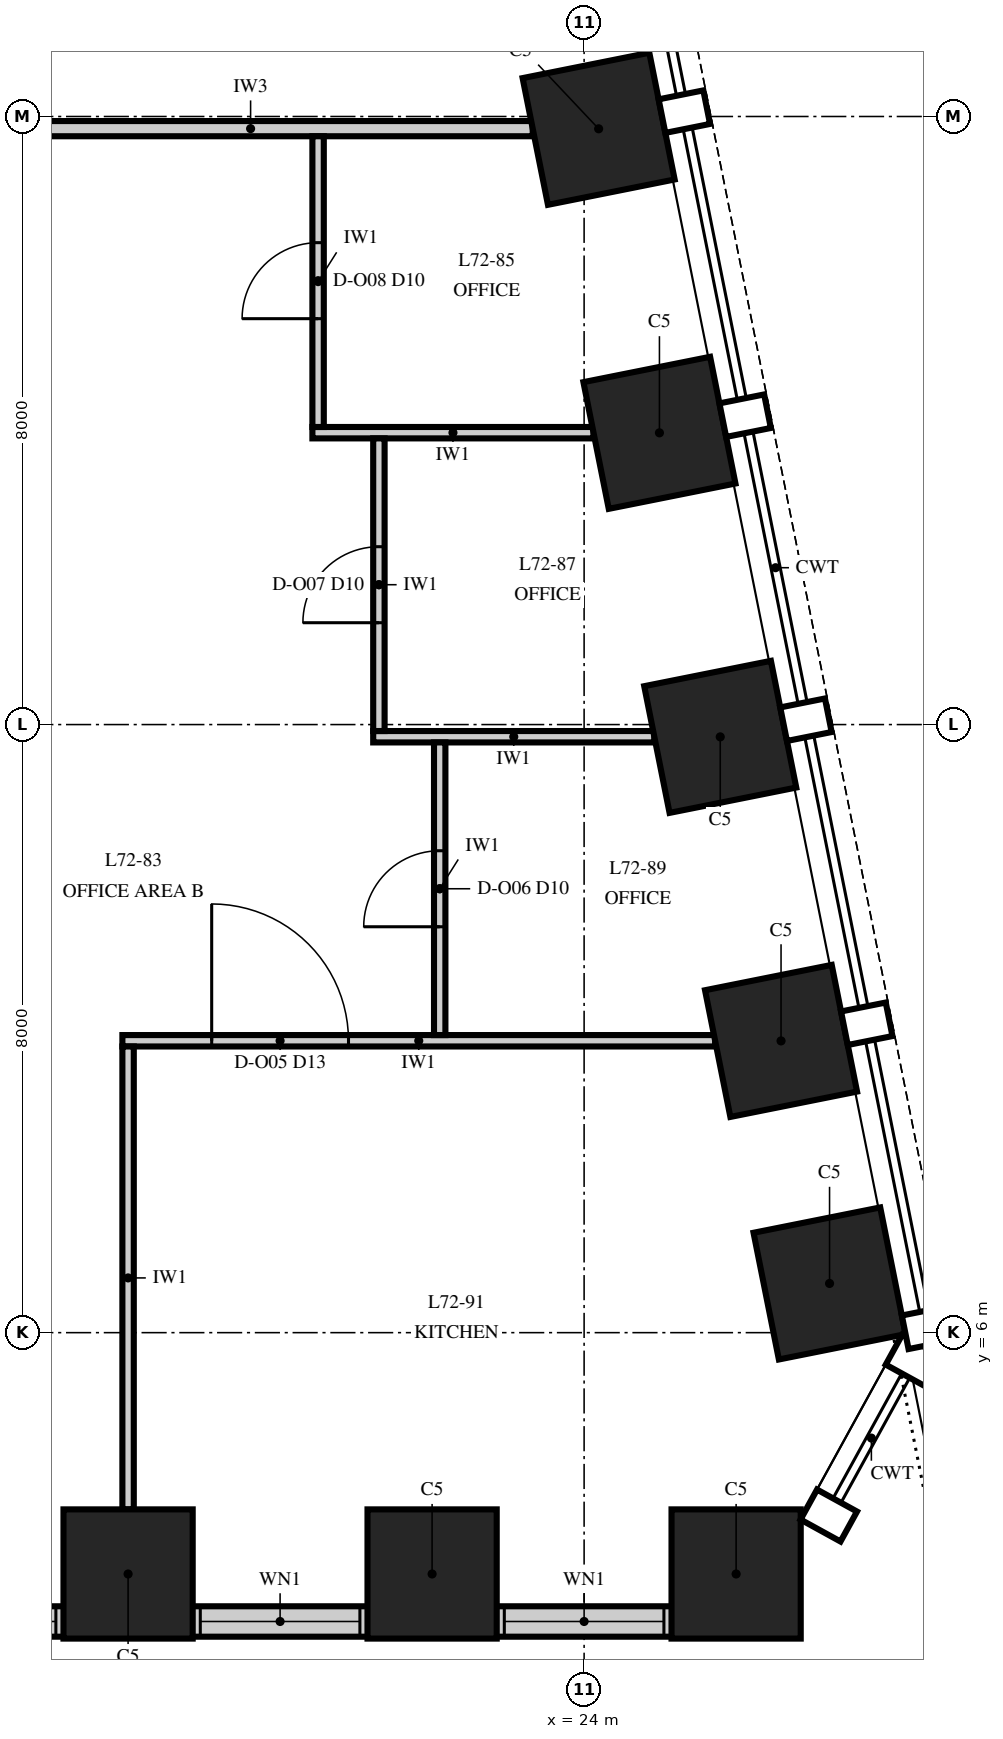
"""IFC4 building model, lengths in metres.
Left out: names, types, materials, properties, quantities, classifications, styles, units other than length and angle.
Written with IfcOpenShell. Run it as: python <this file> out.ifc"""

import sys

from ifc_helpers import new_model, si_unit, direction, frame, frame_2d, origin, origin_2d, place, context, subcontext, project, spatial, rectangle, extrude, element, fill, save


model = new_model("IFC4")
c1 = context("Model", 3, precision=1e-05, world=origin(), true_north=direction((0.0, 1.0)))
c2 = subcontext(c1, "Body", "Model", "MODEL_VIEW")
j1 = project(units=[si_unit("LENGTHUNIT", "METRE"), si_unit("PLANEANGLEUNIT", "RADIAN")], contexts=[c1])
p1 = place(None, origin())
s1 = spatial("IfcSite", under=j1, at=p1, CompositionType="ELEMENT")
p2 = place(p1, origin())
s2 = spatial("IfcBuilding", under=s1, at=p2, CompositionType="ELEMENT")
p3 = place(p2, frame((0.0, 0.0, 308.0)))
s3 = spatial("IfcBuildingStorey", under=s2, at=p3, CompositionType="ELEMENT", Elevation=308.0)
for number, where, z_axis, x_axis in (
    (1, (18.0, 2.825, -0.25), (0.0, 0.0, 1.0), (1.0, 0.0, 0.0)),
    (2, (22.0, 2.825, -0.25), (0.0, 0.0, 1.0), (1.0, 0.0, 0.0)),
    (3, (26.0, 2.825, -0.25), (0.0, 0.0, 1.0), (1.0, 0.0, 0.0)),
):
    element("IfcColumn", number, at=place(p3, frame(where, z_axis=z_axis, x_axis=x_axis)), inside=s3, PredefinedType="COLUMN", context=c2, shape_type="SweptSolid", body=[
        extrude(rectangle(XDim=1.7, YDim=1.7, at=origin_2d()), origin(), (0.0, 0.0, 1.0), 4.25),
    ])
for number, where, z_axis, x_axis in (
    (4, (27.229, 6.647, 0.0), (0.0, 0.0, 1.0), (-0.196, 0.981, 0.0)),
    (5, (26.591, 9.838, 0.0), (0.0, 0.0, 1.0), (-0.196, 0.981, 0.0)),
    (6, (25.791, 13.838, 0.0), (0.0, 0.0, 1.0), (-0.196, 0.981, 0.0)),
    (7, (24.991, 17.838, 0.0), (0.0, 0.0, 1.0), (-0.196, 0.981, 0.0)),
    (8, (24.191, 21.838, 0.0), (0.0, 0.0, 1.0), (-0.196, 0.981, 0.0)),
):
    element("IfcColumn", number, at=place(p3, frame(where, z_axis=z_axis, x_axis=x_axis)), inside=s3, PredefinedType="COLUMN", context=c2, shape_type="SweptSolid", body=[
        extrude(rectangle(XDim=1.7, YDim=1.7, at=origin_2d()), origin(), (0.0, 0.0, 1.0), 4.0),
    ])
p4 = place(p3, frame((-26.0, 2.2, 0.0), z_axis=(0.0, 0.0, 1.0), x_axis=(1.0, 0.0, 0.0)))
e9 = element("IfcWall", 9, at=p4, inside=s3, PredefinedType="SOLIDWALL", context=c2, shape_type="SweptSolid", body=[
    extrude(rectangle(XDim=52.0, YDim=0.4, at=frame_2d((26.0, 0.0))), origin(), (0.0, 0.0, 1.0), 2.0),
])
p5 = place(p4, frame((0.95, 0.0, 0.8)))
e10 = element("IfcOpeningElement", 10, at=p5, cuts=e9, PredefinedType="OPENING", context=c2, shape_type="SweptSolid", body=[
    extrude(rectangle(XDim=2.1, YDim=1.15, at=frame_2d((1.05, 0.575))), frame((0.0, 0.215, 0.0), z_axis=(0.0, -1.0, 0.0), x_axis=(1.0, 0.0, 0.0)), (0.0, 0.0, 1.0), 0.43),
])
p6 = place(p4, frame((4.95, 0.0, 0.8)))
e11 = element("IfcOpeningElement", 11, at=p6, cuts=e9, PredefinedType="OPENING", context=c2, shape_type="SweptSolid", body=[
    extrude(rectangle(XDim=2.1, YDim=1.15, at=frame_2d((1.05, 0.575))), frame((0.0, 0.215, 0.0), z_axis=(0.0, -1.0, 0.0), x_axis=(1.0, 0.0, 0.0)), (0.0, 0.0, 1.0), 0.43),
])
p7 = place(p4, frame((8.95, 0.0, 0.8)))
e12 = element("IfcOpeningElement", 12, at=p7, cuts=e9, PredefinedType="OPENING", context=c2, shape_type="SweptSolid", body=[
    extrude(rectangle(XDim=2.1, YDim=1.15, at=frame_2d((1.05, 0.575))), frame((0.0, 0.215, 0.0), z_axis=(0.0, -1.0, 0.0), x_axis=(1.0, 0.0, 0.0)), (0.0, 0.0, 1.0), 0.43),
])
p8 = place(p4, frame((12.95, 0.0, 0.8)))
e13 = element("IfcOpeningElement", 13, at=p8, cuts=e9, PredefinedType="OPENING", context=c2, shape_type="SweptSolid", body=[
    extrude(rectangle(XDim=2.1, YDim=1.15, at=frame_2d((1.05, 0.575))), frame((0.0, 0.215, 0.0), z_axis=(0.0, -1.0, 0.0), x_axis=(1.0, 0.0, 0.0)), (0.0, 0.0, 1.0), 0.43),
])
p9 = place(p4, frame((16.95, 0.0, 0.8)))
e14 = element("IfcOpeningElement", 14, at=p9, cuts=e9, PredefinedType="OPENING", context=c2, shape_type="SweptSolid", body=[
    extrude(rectangle(XDim=2.1, YDim=1.15, at=frame_2d((1.05, 0.575))), frame((0.0, 0.215, 0.0), z_axis=(0.0, -1.0, 0.0), x_axis=(1.0, 0.0, 0.0)), (0.0, 0.0, 1.0), 0.43),
])
p10 = place(p4, frame((21.1, 0.0, 0.0)))
e15 = element("IfcOpeningElement", 15, at=p10, cuts=e9, PredefinedType="OPENING", context=c2, shape_type="SweptSolid", body=[
    extrude(rectangle(XDim=1.8, YDim=2.0, at=frame_2d((0.9, 1.0))), frame((0.0, 0.215, 0.0), z_axis=(0.0, -1.0, 0.0), x_axis=(1.0, 0.0, 0.0)), (0.0, 0.0, 1.0), 0.43),
])
p11 = place(p4, frame((24.95, 0.0, 0.8)))
e16 = element("IfcOpeningElement", 16, at=p11, cuts=e9, PredefinedType="OPENING", context=c2, shape_type="SweptSolid", body=[
    extrude(rectangle(XDim=2.1, YDim=1.15, at=frame_2d((1.05, 0.575))), frame((0.0, 0.215, 0.0), z_axis=(0.0, -1.0, 0.0), x_axis=(1.0, 0.0, 0.0)), (0.0, 0.0, 1.0), 0.43),
])
p12 = place(p4, frame((29.1, 0.0, 0.0)))
e17 = element("IfcOpeningElement", 17, at=p12, cuts=e9, PredefinedType="OPENING", context=c2, shape_type="SweptSolid", body=[
    extrude(rectangle(XDim=1.8, YDim=2.0, at=frame_2d((0.9, 1.0))), frame((0.0, 0.215, 0.0), z_axis=(0.0, -1.0, 0.0), x_axis=(1.0, 0.0, 0.0)), (0.0, 0.0, 1.0), 0.43),
])
p13 = place(p4, frame((32.95, 0.0, 0.8)))
e18 = element("IfcOpeningElement", 18, at=p13, cuts=e9, PredefinedType="OPENING", context=c2, shape_type="SweptSolid", body=[
    extrude(rectangle(XDim=2.1, YDim=1.15, at=frame_2d((1.05, 0.575))), frame((0.0, 0.215, 0.0), z_axis=(0.0, -1.0, 0.0), x_axis=(1.0, 0.0, 0.0)), (0.0, 0.0, 1.0), 0.43),
])
p14 = place(p4, frame((36.95, 0.0, 0.8)))
e19 = element("IfcOpeningElement", 19, at=p14, cuts=e9, PredefinedType="OPENING", context=c2, shape_type="SweptSolid", body=[
    extrude(rectangle(XDim=2.1, YDim=1.15, at=frame_2d((1.05, 0.575))), frame((0.0, 0.215, 0.0), z_axis=(0.0, -1.0, 0.0), x_axis=(1.0, 0.0, 0.0)), (0.0, 0.0, 1.0), 0.43),
])
p15 = place(p4, frame((40.95, 0.0, 0.8)))
e20 = element("IfcOpeningElement", 20, at=p15, cuts=e9, PredefinedType="OPENING", context=c2, shape_type="SweptSolid", body=[
    extrude(rectangle(XDim=2.1, YDim=1.15, at=frame_2d((1.05, 0.575))), frame((0.0, 0.215, 0.0), z_axis=(0.0, -1.0, 0.0), x_axis=(1.0, 0.0, 0.0)), (0.0, 0.0, 1.0), 0.43),
])
p16 = place(p4, frame((44.95, 0.0, 0.8)))
e21 = element("IfcOpeningElement", 21, at=p16, cuts=e9, PredefinedType="OPENING", context=c2, shape_type="SweptSolid", body=[
    extrude(rectangle(XDim=2.1, YDim=1.15, at=frame_2d((1.05, 0.575))), frame((0.0, 0.215, 0.0), z_axis=(0.0, -1.0, 0.0), x_axis=(1.0, 0.0, 0.0)), (0.0, 0.0, 1.0), 0.43),
])
p17 = place(p4, frame((48.95, 0.0, 0.8)))
e22 = element("IfcOpeningElement", 22, at=p17, cuts=e9, PredefinedType="OPENING", context=c2, shape_type="SweptSolid", body=[
    extrude(rectangle(XDim=2.1, YDim=1.15, at=frame_2d((1.05, 0.575))), frame((0.0, 0.215, 0.0), z_axis=(0.0, -1.0, 0.0), x_axis=(1.0, 0.0, 0.0)), (0.0, 0.0, 1.0), 0.43),
])
p18 = place(p3, frame((17.925, 9.84, 0.0), z_axis=(0.0, 0.0, 1.0), x_axis=(1.0, 0.0, 0.0)))
e23 = element("IfcWall", 23, at=p18, inside=s3, PredefinedType="PARTITIONING", context=c2, shape_type="SweptSolid", body=[
    extrude(rectangle(XDim=7.799, YDim=0.15, at=frame_2d((3.899, 0.0))), origin(), (0.0, 0.0, 1.0), 3.23),
])
p19 = place(p18, frame((1.175, 0.0, 0.0)))
e24 = element("IfcOpeningElement", 24, at=p19, cuts=e23, PredefinedType="OPENING", context=c2, shape_type="SweptSolid", body=[
    extrude(rectangle(XDim=1.8, YDim=2.4, at=frame_2d((0.9, 1.2))), frame((0.0, 0.09, 0.0), z_axis=(0.0, -1.0, 0.0), x_axis=(1.0, 0.0, 0.0)), (0.0, 0.0, 1.0), 0.18),
])
for number, where, z_axis, x_axis in (
    (25, (21.225, 13.84, 0.0), (0.0, 0.0, 1.0), (1.0, 0.0, 0.0)),
    (26, (20.425, 17.84, 0.0), (0.0, 0.0, 1.0), (1.0, 0.0, 0.0)),
):
    element("IfcWall", number, at=place(p3, frame(where, z_axis=z_axis, x_axis=x_axis)), inside=s3, PredefinedType="PARTITIONING", context=c2, shape_type="SweptSolid", body=[
        extrude(rectangle(XDim=3.699, YDim=0.15, at=frame_2d((1.849, 0.0))), origin(), (0.0, 0.0, 1.0), 3.23),
    ])
p20 = place(p3, frame((15.9, 21.84, 0.0), z_axis=(0.0, 0.0, 1.0), x_axis=(1.0, 0.0, 0.0)))
e27 = element("IfcWall", 27, at=p20, inside=s3, PredefinedType="PARTITIONING", context=c2, shape_type="SweptSolid", body=[
    extrude(rectangle(XDim=7.424, YDim=0.2, at=frame_2d((3.712, 0.0))), origin(), (0.0, 0.0, 1.0), 3.23),
])
p21 = place(p3, frame((18.0, 3.675, 0.0), z_axis=(0.0, 0.0, 1.0), x_axis=(0.0, 1.0, 0.0)))
e28 = element("IfcWall", 28, at=p21, inside=s3, PredefinedType="PARTITIONING", context=c2, shape_type="SweptSolid", body=[
    extrude(rectangle(XDim=6.09, YDim=0.15, at=frame_2d((3.045, 0.0))), origin(), (0.0, 0.0, 1.0), 2.842),
])
p22 = place(p3, frame((20.5, 17.915, 0.0), z_axis=(0.0, 0.0, 1.0), x_axis=(0.0, 1.0, 0.0)))
e29 = element("IfcWall", 29, at=p22, inside=s3, PredefinedType="PARTITIONING", context=c2, shape_type="SweptSolid", body=[
    extrude(rectangle(XDim=3.825, YDim=0.15, at=frame_2d((1.913, 0.0))), origin(), (0.0, 0.0, 1.0), 3.23),
])
p23 = place(p22, frame((1.425, 0.0, 0.0)))
e30 = element("IfcOpeningElement", 30, at=p23, cuts=e29, PredefinedType="OPENING", context=c2, shape_type="SweptSolid", body=[
    extrude(rectangle(XDim=1.0, YDim=2.3, at=frame_2d((0.5, 1.15))), frame((0.0, 0.09, 0.0), z_axis=(0.0, -1.0, 0.0), x_axis=(1.0, 0.0, 0.0)), (0.0, 0.0, 1.0), 0.18),
])
p24 = place(p3, frame((21.3, 13.915, 0.0), z_axis=(0.0, 0.0, 1.0), x_axis=(0.0, 1.0, 0.0)))
e31 = element("IfcWall", 31, at=p24, inside=s3, PredefinedType="PARTITIONING", context=c2, shape_type="SweptSolid", body=[
    extrude(rectangle(XDim=3.85, YDim=0.15, at=frame_2d((1.925, 0.0))), origin(), (0.0, 0.0, 1.0), 3.23),
])
p25 = place(p24, frame((1.425, 0.0, 0.0)))
e32 = element("IfcOpeningElement", 32, at=p25, cuts=e31, PredefinedType="OPENING", context=c2, shape_type="SweptSolid", body=[
    extrude(rectangle(XDim=1.0, YDim=2.3, at=frame_2d((0.5, 1.15))), frame((0.0, 0.09, 0.0), z_axis=(0.0, -1.0, 0.0), x_axis=(1.0, 0.0, 0.0)), (0.0, 0.0, 1.0), 0.18),
])
p26 = place(p3, frame((22.1, 9.915, 0.0), z_axis=(0.0, 0.0, 1.0), x_axis=(0.0, 1.0, 0.0)))
e33 = element("IfcWall", 33, at=p26, inside=s3, PredefinedType="PARTITIONING", context=c2, shape_type="SweptSolid", body=[
    extrude(rectangle(XDim=3.85, YDim=0.15, at=frame_2d((1.925, 0.0))), origin(), (0.0, 0.0, 1.0), 3.85),
])
p27 = place(p26, frame((1.425, 0.0, 0.0)))
e34 = element("IfcOpeningElement", 34, at=p27, cuts=e33, PredefinedType="OPENING", context=c2, shape_type="SweptSolid", body=[
    extrude(rectangle(XDim=1.0, YDim=2.3, at=frame_2d((0.5, 1.15))), frame((0.0, 0.09, 0.0), z_axis=(0.0, -1.0, 0.0), x_axis=(1.0, 0.0, 0.0)), (0.0, 0.0, 1.0), 0.18),
])
p28 = place(p15, origin())
e35 = element("IfcWindow", 35, at=p28, inside=s3, PartitioningType="SINGLE_PANEL", PredefinedType="WINDOW", context=c2, shape_type="SweptSolid", body=[
    extrude(rectangle(XDim=2.1, YDim=1.15, at=frame_2d((1.05, 0.575))), frame((0.0, 0.03, 0.0), z_axis=(0.0, -1.0, 0.0), x_axis=(1.0, 0.0, 0.0)), (0.0, 0.0, 1.0), 0.06),
])
fill(e20, e35)
p29 = place(p16, origin())
e36 = element("IfcWindow", 36, at=p29, inside=s3, PartitioningType="SINGLE_PANEL", PredefinedType="WINDOW", context=c2, shape_type="SweptSolid", body=[
    extrude(rectangle(XDim=2.1, YDim=1.15, at=frame_2d((1.05, 0.575))), frame((0.0, 0.03, 0.0), z_axis=(0.0, -1.0, 0.0), x_axis=(1.0, 0.0, 0.0)), (0.0, 0.0, 1.0), 0.06),
])
fill(e21, e36)
p30 = place(p17, origin())
e37 = element("IfcWindow", 37, at=p30, inside=s3, PartitioningType="SINGLE_PANEL", PredefinedType="WINDOW", context=c2, shape_type="SweptSolid", body=[
    extrude(rectangle(XDim=2.1, YDim=1.15, at=frame_2d((1.05, 0.575))), frame((0.0, 0.03, 0.0), z_axis=(0.0, -1.0, 0.0), x_axis=(1.0, 0.0, 0.0)), (0.0, 0.0, 1.0), 0.06),
])
fill(e22, e37)
p31 = place(p19, origin())
e38 = element("IfcDoor", 38, at=p31, inside=s3, OperationType="DOUBLE_DOOR_SINGLE_SWING", PredefinedType="DOOR", context=c2, shape_type="SweptSolid", body=[
    extrude(rectangle(XDim=1.8, YDim=2.4, at=frame_2d((0.9, 1.2))), frame((0.0, 0.075, 0.0), z_axis=(0.0, -1.0, 0.0), x_axis=(1.0, 0.0, 0.0)), (0.0, 0.0, 1.0), 0.149),
])
fill(e24, e38)
p32 = place(p27, origin())
e39 = element("IfcDoor", 39, at=p32, inside=s3, OperationType="SINGLE_SWING_LEFT", PredefinedType="DOOR", context=c2, shape_type="SweptSolid", body=[
    extrude(rectangle(XDim=1.0, YDim=2.3, at=frame_2d((0.5, 1.15))), frame((0.0, 0.075, 0.0), z_axis=(0.0, -1.0, 0.0), x_axis=(1.0, 0.0, 0.0)), (0.0, 0.0, 1.0), 0.149),
])
fill(e34, e39)
p33 = place(p25, origin())
e40 = element("IfcDoor", 40, at=p33, inside=s3, OperationType="SINGLE_SWING_LEFT", PredefinedType="DOOR", context=c2, shape_type="SweptSolid", body=[
    extrude(rectangle(XDim=1.0, YDim=2.3, at=frame_2d((0.5, 1.15))), frame((0.0, 0.075, 0.0), z_axis=(0.0, -1.0, 0.0), x_axis=(1.0, 0.0, 0.0)), (0.0, 0.0, 1.0), 0.149),
])
fill(e32, e40)
p34 = place(p23, origin())
e41 = element("IfcDoor", 41, at=p34, inside=s3, OperationType="SINGLE_SWING_LEFT", PredefinedType="DOOR", context=c2, shape_type="SweptSolid", body=[
    extrude(rectangle(XDim=1.0, YDim=2.3, at=frame_2d((0.5, 1.15))), frame((0.0, 0.075, 0.0), z_axis=(0.0, -1.0, 0.0), x_axis=(1.0, 0.0, 0.0)), (0.0, 0.0, 1.0), 0.149),
])
fill(e30, e41)
save(model, sys.argv[1])
